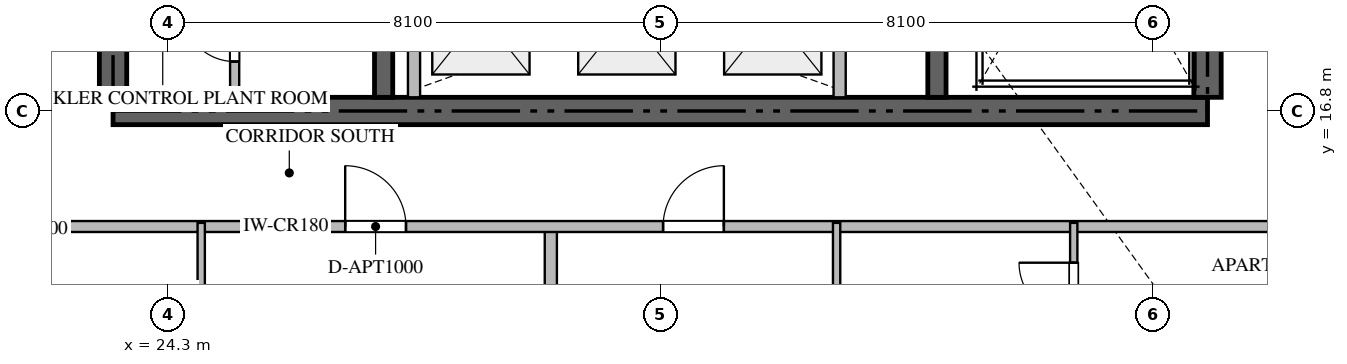
"""IFC4 building model, lengths in metres.
Left out: names, types, materials, properties, quantities, classifications, styles, units other than length and angle.
Written with IfcOpenShell. Run it as: python <this file> out.ifc"""

import sys

from ifc_helpers import new_model, si_unit, direction, frame, frame_2d, origin, place, context, subcontext, project, spatial, rectangle, extrude, source, transform, mapped, element, fill, save


model = new_model("IFC4")
c1 = context("Model", 3, precision=1e-05, world=origin(), true_north=direction((0.0, 1.0)))
c2 = subcontext(c1, "Body", "Model", "MODEL_VIEW")
j1 = project(units=[si_unit("LENGTHUNIT", "METRE"), si_unit("PLANEANGLEUNIT", "RADIAN")], contexts=[c1])
p1 = place(None, origin())
s1 = spatial("IfcSite", under=j1, at=p1, CompositionType="ELEMENT")
p2 = place(p1, origin())
s2 = spatial("IfcBuilding", under=s1, at=p2, CompositionType="ELEMENT")
p3 = place(p2, frame((0.0, 0.0, 41.7)))
s3 = spatial("IfcBuildingStorey", under=s2, at=p3, CompositionType="ELEMENT", Elevation=41.7)
p4 = place(p3, frame((23.4, 16.8, -0.26), z_axis=(0.0, 0.0, 1.0), x_axis=(1.0, 0.0, 0.0)))
e1 = element("IfcWall", 1, at=p4, inside=s3, PredefinedType="SHEAR", context=c2, shape_type="SweptSolid", body=[
    extrude(rectangle(XDim=18.0, YDim=0.45, at=frame_2d((9.0, 0.0))), origin(), (0.0, 0.0, 1.0), 3.748),
])
p5 = place(p3, frame((23.4, 17.025, -0.26), z_axis=(0.0, 0.0, 1.0), x_axis=(0.0, 1.0, 0.0)))
e2 = element("IfcWall", 2, at=p5, inside=s3, PredefinedType="SHEAR", context=c2, shape_type="SweptSolid", body=[
    extrude(rectangle(XDim=4.825, YDim=0.45, at=frame_2d((2.413, 0.0))), origin(), (0.0, 0.0, 1.0), 3.748),
])
p6 = place(p3, frame((41.4, 17.025, -0.26), z_axis=(0.0, 0.0, 1.0), x_axis=(0.0, 1.0, 0.0)))
e3 = element("IfcWall", 3, at=p6, inside=s3, PredefinedType="SHEAR", context=c2, shape_type="SweptSolid", body=[
    extrude(rectangle(XDim=8.325, YDim=0.45, at=frame_2d((4.163, 0.0))), origin(), (0.0, 0.0, 1.0), 3.748),
])
p7 = place(p3, frame((27.85, 17.025, -0.26), z_axis=(0.0, 0.0, 1.0), x_axis=(0.0, 1.0, 0.0)))
e4 = element("IfcWall", 4, at=p7, inside=s3, PredefinedType="SHEAR", context=c2, shape_type="SweptSolid", body=[
    extrude(rectangle(XDim=4.825, YDim=0.3, at=frame_2d((2.413, 0.0))), origin(), (0.0, 0.0, 1.0), 3.748),
])
p8 = place(p3, frame((36.95, 17.025, -0.26), z_axis=(0.0, 0.0, 1.0), x_axis=(0.0, 1.0, 0.0)))
e5 = element("IfcWall", 5, at=p8, inside=s3, PredefinedType="SHEAR", context=c2, shape_type="SweptSolid", body=[
    extrude(rectangle(XDim=8.325, YDim=0.3, at=frame_2d((4.163, 0.0))), origin(), (0.0, 0.0, 1.0), 3.748),
])
for number, where, z_axis, x_axis in (
    (6, (28.35, 17.025, 0.0), (0.0, 0.0, 1.0), (0.0, 1.0, 0.0)),
    (7, (35.35, 17.025, 0.0), (0.0, 0.0, 1.0), (0.0, 1.0, 0.0)),
):
    element("IfcWall", number, at=place(p3, frame(where, z_axis=z_axis, x_axis=x_axis)), inside=s3, PredefinedType="STANDARD", context=c2, shape_type="SweptSolid", body=[
        extrude(rectangle(XDim=2.525, YDim=0.2, at=frame_2d((1.263, 0.0))), origin(), (0.0, 0.0, 1.0), 3.49),
    ])
p9 = place(p3, frame((25.4, 17.025, 0.0), z_axis=(0.0, 0.0, 1.0), x_axis=(0.0, 1.0, 0.0)))
e8 = element("IfcWall", 8, at=p9, inside=s3, PredefinedType="PARTITIONING", context=c2, shape_type="SweptSolid", body=[
    extrude(rectangle(XDim=2.025, YDim=0.15, at=frame_2d((1.013, 0.0))), origin(), (0.0, 0.0, 1.0), 3.49),
])
p10 = place(p9, frame((0.588, 0.0, 0.0)))
e9 = element("IfcOpeningElement", 9, at=p10, cuts=e8, PredefinedType="OPENING", context=c2, shape_type="SweptSolid", body=[
    extrude(rectangle(XDim=0.85, YDim=2.1, at=frame_2d((0.425, 1.05))), frame((0.0, 0.085, 0.0), z_axis=(0.0, -1.0, 0.0), x_axis=(1.0, 0.0, 0.0)), (0.0, 0.0, 1.0), 0.17),
])
p11 = place(p3, frame((30.6, 0.282, 0.0), z_axis=(0.0, 0.0, 1.0), x_axis=(0.0, 1.0, 0.0)))
e10 = element("IfcWall", 10, at=p11, inside=s3, PredefinedType="PARTITIONING", context=c2, shape_type="SweptSolid", body=[
    extrude(rectangle(XDim=14.618, YDim=0.2, at=frame_2d((7.309, 0.0))), origin(), (0.0, 0.0, 1.0), 3.49),
])
p12 = place(p3, frame((21.402, 14.9, 0.0), z_axis=(0.0, 0.0, 1.0), x_axis=(1.0, 0.0, 0.0)))
e11 = element("IfcWall", 11, at=p12, inside=s3, PredefinedType="PARTITIONING", context=c2, shape_type="SweptSolid", body=[
    extrude(rectangle(XDim=21.996, YDim=0.18, at=frame_2d((10.998, 0.0))), origin(), (0.0, 0.0, 1.0), 3.49),
])
p13 = place(p12, frame((5.816, 0.0, 0.0)))
e12 = element("IfcOpeningElement", 12, at=p13, cuts=e11, PredefinedType="OPENING", context=c2, shape_type="SweptSolid", body=[
    extrude(rectangle(XDim=1.0, YDim=2.15, at=frame_2d((0.5, 1.075))), frame((0.0, 0.1, 0.0), z_axis=(0.0, -1.0, 0.0), x_axis=(1.0, 0.0, 0.0)), (0.0, 0.0, 1.0), 0.2),
])
p14 = place(p12, frame((11.044, 0.0, 0.0)))
e13 = element("IfcOpeningElement", 13, at=p14, cuts=e11, PredefinedType="OPENING", context=c2, shape_type="SweptSolid", body=[
    extrude(rectangle(XDim=1.0, YDim=2.15, at=frame_2d((0.5, 1.075))), frame((0.0, 0.1, 0.0), z_axis=(0.0, -1.0, 0.0), x_axis=(1.0, 0.0, 0.0)), (0.0, 0.0, 1.0), 0.2),
])
for number, where, z_axis, x_axis in (
    (14, (24.85, 12.15, 0.0), (0.0, 0.0, 1.0), (0.0, 1.0, 0.0)),
    (15, (35.3, 12.15, 0.0), (0.0, 0.0, 1.0), (0.0, 1.0, 0.0)),
):
    element("IfcWall", number, at=place(p3, frame(where, z_axis=z_axis, x_axis=x_axis)), inside=s3, PredefinedType="PARTITIONING", context=c2, shape_type="SweptSolid", body=[
        extrude(rectangle(XDim=2.81, YDim=0.12, at=frame_2d((1.405, 0.0))), origin(), (0.0, 0.0, 1.0), 3.49),
    ])
p15 = place(p3, frame((39.2, 12.75, 0.0), z_axis=(0.0, 0.0, 1.0), x_axis=(0.0, 1.0, 0.0)))
e16 = element("IfcWall", 16, at=p15, inside=s3, PredefinedType="PARTITIONING", context=c2, shape_type="SweptSolid", body=[
    extrude(rectangle(XDim=2.21, YDim=0.12, at=frame_2d((1.105, 0.0))), origin(), (0.0, 0.0, 1.0), 3.49),
])
p16 = place(p15, frame((0.655, 0.0, 0.0)))
e17 = element("IfcOpeningElement", 17, at=p16, cuts=e16, PredefinedType="OPENING", context=c2, shape_type="SweptSolid", body=[
    extrude(rectangle(XDim=0.9, YDim=2.1, at=frame_2d((0.45, 1.05))), frame((0.0, 0.07, 0.0), z_axis=(0.0, -1.0, 0.0), x_axis=(1.0, 0.0, 0.0)), (0.0, 0.0, 1.0), 0.14),
])
m1 = source(origin(), c2, "Body", "SweptSolid", [
    extrude(rectangle(XDim=0.85, YDim=2.1, at=frame_2d((0.425, 1.05))), frame((0.0, 0.025, 0.0), z_axis=(0.0, -1.0, 0.0), x_axis=(1.0, 0.0, 0.0)), (0.0, 0.0, 1.0), 0.05),
])
p17 = place(p10, origin())
e18 = element("IfcDoor", 18, at=p17, inside=s3, OperationType="SINGLE_SWING_RIGHT", PredefinedType="DOOR", context=c2, shape_type="MappedRepresentation", body=[
    mapped(m1, transform((0.0, 0.0, 0.0), scale=1.0)),
])
fill(e9, e18)
m2 = source(origin(), c2, "Body", "SweptSolid", [
    extrude(rectangle(XDim=1.0, YDim=2.15, at=frame_2d((0.5, 1.075))), frame((0.0, 0.025, 0.0), z_axis=(0.0, -1.0, 0.0), x_axis=(1.0, 0.0, 0.0)), (0.0, 0.0, 1.0), 0.05),
])
p18 = place(p13, origin())
e19 = element("IfcDoor", 19, at=p18, inside=s3, OperationType="SINGLE_SWING_LEFT", PredefinedType="DOOR", context=c2, shape_type="MappedRepresentation", body=[
    mapped(m2, transform((0.0, 0.0, 0.0), scale=1.0)),
])
fill(e12, e19)
p19 = place(p14, origin())
e20 = element("IfcDoor", 20, at=p19, inside=s3, OperationType="SINGLE_SWING_RIGHT", PredefinedType="DOOR", context=c2, shape_type="MappedRepresentation", body=[
    mapped(m2, transform((0.0, 0.0, 0.0), scale=1.0)),
])
fill(e13, e20)
m3 = source(origin(), c2, "Body", "SweptSolid", [
    extrude(rectangle(XDim=0.9, YDim=2.1, at=frame_2d((0.45, 1.05))), frame((0.0, 0.025, 0.0), z_axis=(0.0, -1.0, 0.0), x_axis=(1.0, 0.0, 0.0)), (0.0, 0.0, 1.0), 0.05),
])
p20 = place(p16, origin())
e21 = element("IfcDoor", 21, at=p20, inside=s3, OperationType="SINGLE_SWING_RIGHT", PredefinedType="DOOR", context=c2, shape_type="MappedRepresentation", body=[
    mapped(m3, transform((0.0, 0.0, 0.0), scale=1.0)),
])
fill(e17, e21)
save(model, sys.argv[1])
